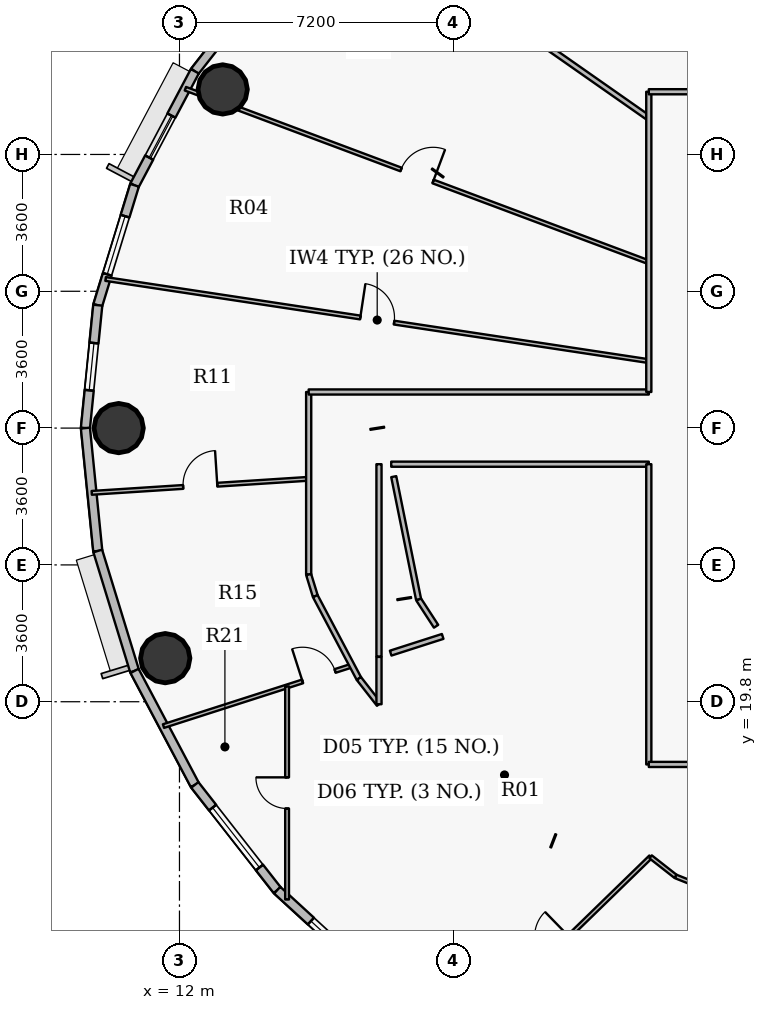
"""IFC4 building model, lengths in metres.
Left out: names, types, materials, properties, quantities, classifications, styles, units other than length and angle.
Written with IfcOpenShell. Run it as: python <this file> out.ifc"""

import sys

from ifc_helpers import new_model, si_unit, direction, frame, frame_2d, origin, origin_2d, place, context, subcontext, project, spatial, rectangle, hollow_circle, extrude, source, transform, mapped, element, fill, save


model = new_model("IFC4")
c1 = context("Model", 3, precision=1e-05, world=origin(), true_north=direction((0.0, 1.0)))
c2 = subcontext(c1, "Body", "Model", "MODEL_VIEW")
j1 = project(units=[si_unit("LENGTHUNIT", "METRE"), si_unit("PLANEANGLEUNIT", "RADIAN")], contexts=[c1])
p1 = place(None, origin())
s1 = spatial("IfcSite", under=j1, at=p1, CompositionType="ELEMENT")
p2 = place(p1, origin())
s2 = spatial("IfcBuilding", under=s1, at=p2, CompositionType="ELEMENT")
p3 = place(p2, frame((0.0, 0.0, 171.15)))
s3 = spatial("IfcBuildingStorey", under=s2, at=p3, CompositionType="ELEMENT", Elevation=171.15)
for number, where, z_axis, x_axis in (
    (1, (13.137, 35.911, 0.0), (0.0, 0.0, 1.0), (1.0, 0.0, 0.0)),
    (2, (10.4, 27.0, 0.0), (0.0, 0.0, 1.0), (1.0, 0.0, 0.0)),
    (3, (11.625, 20.947, 0.0), (0.0, 0.0, 1.0), (1.0, 0.0, 0.0)),
):
    element("IfcColumn", number, at=place(p3, frame(where, z_axis=z_axis, x_axis=x_axis)), inside=s3, PredefinedType="COLUMN", context=c2, shape_type="SweptSolid", body=[
        extrude(hollow_circle(Radius=0.65, WallThickness=0.04, at=origin_2d()), origin(), (0.0, 0.0, 1.0), 3.75),
    ])
p4 = place(p3, frame((12.404, 36.388, 0.0), z_axis=(0.0, 0.0, 1.0), x_axis=(0.616287674549, 0.787521112224, 0.0)))
e4 = element("IfcWall", 4, at=p4, inside=s3, PredefinedType="SOLIDWALL", context=c2, shape_type="SweptSolid", body=[
    extrude(rectangle(XDim=3.517, YDim=0.24, at=frame_2d((1.759, 0.0))), origin(), (0.0, 0.0, 1.0), 3.5),
])
p5 = place(p3, frame((10.817, 33.389, 0.0), z_axis=(0.0, 0.0, 1.0), x_axis=(0.467586874938, 0.88394712194, 0.0)))
e5 = element("IfcWall", 5, at=p5, inside=s3, PredefinedType="SOLIDWALL", context=c2, shape_type="SweptSolid", body=[
    extrude(rectangle(XDim=3.393, YDim=0.24, at=frame_2d((1.697, 0.0))), origin(), (0.0, 0.0, 1.0), 3.5),
])
p6 = place(p5, frame((0.825, 0.0, 0.9)))
e6 = element("IfcOpeningElement", 6, at=p6, cuts=e5, PredefinedType="OPENING", context=c2, shape_type="SweptSolid", body=[
    extrude(rectangle(XDim=1.25, YDim=1.65, at=origin_2d()), frame((0.625, 0.13, 0.825), z_axis=(0.0, -1.0, 0.0), x_axis=(1.0, 0.0, 0.0)), (0.0, 0.0, 1.0), 0.26),
])
p7 = place(p3, frame((9.85, 30.234, 0.0), z_axis=(0.0, 0.0, 1.0), x_axis=(0.293097995113, 0.956082405058, 0.0)))
e7 = element("IfcWall", 7, at=p7, inside=s3, PredefinedType="SOLIDWALL", context=c2, shape_type="SweptSolid", body=[
    extrude(rectangle(XDim=3.3, YDim=0.24, at=frame_2d((1.65, 0.0))), origin(), (0.0, 0.0, 1.0), 3.5),
])
p8 = place(p7, frame((0.85, 0.0, 0.9)))
e8 = element("IfcOpeningElement", 8, at=p8, cuts=e7, PredefinedType="OPENING", context=c2, shape_type="SweptSolid", body=[
    extrude(rectangle(XDim=1.6, YDim=1.75, at=origin_2d()), frame((0.8, 0.13, 0.875), z_axis=(0.0, -1.0, 0.0), x_axis=(1.0, 0.0, 0.0)), (0.0, 0.0, 1.0), 0.26),
])
p9 = place(p3, frame((9.525, 27.0, 0.0), z_axis=(0.0, 0.0, 1.0), x_axis=(0.100061534614, 0.994981250723, 0.0)))
e9 = element("IfcWall", 9, at=p9, inside=s3, PredefinedType="SOLIDWALL", context=c2, shape_type="SweptSolid", body=[
    extrude(rectangle(XDim=3.25, YDim=0.24, at=frame_2d((1.625, 0.0))), origin(), (0.0, 0.0, 1.0), 3.5),
])
p10 = place(p9, frame((1.0, 0.0, 0.9)))
e10 = element("IfcOpeningElement", 10, at=p10, cuts=e9, PredefinedType="OPENING", context=c2, shape_type="SweptSolid", body=[
    extrude(rectangle(XDim=1.25, YDim=1.65, at=origin_2d()), frame((0.625, 0.13, 0.825), z_axis=(0.0, -1.0, 0.0), x_axis=(1.0, 0.0, 0.0)), (0.0, 0.0, 1.0), 0.26),
])
p11 = place(p3, frame((9.85, 23.766, 0.0), z_axis=(0.0, 0.0, 1.0), x_axis=(-0.100061534614, 0.994981250723, 0.0)))
e11 = element("IfcWall", 11, at=p11, inside=s3, PredefinedType="SOLIDWALL", context=c2, shape_type="SweptSolid", body=[
    extrude(rectangle(XDim=3.25, YDim=0.24, at=frame_2d((1.625, 0.0))), origin(), (0.0, 0.0, 1.0), 3.5),
])
p12 = place(p3, frame((10.817, 20.611, 0.0), z_axis=(0.0, 0.0, 1.0), x_axis=(-0.293097995113, 0.956082405058, 0.0)))
e12 = element("IfcWall", 12, at=p12, inside=s3, PredefinedType="SOLIDWALL", context=c2, shape_type="SweptSolid", body=[
    extrude(rectangle(XDim=3.3, YDim=0.24, at=frame_2d((1.65, 0.0))), origin(), (0.0, 0.0, 1.0), 3.5),
])
p13 = place(p3, frame((12.404, 17.612, 0.0), z_axis=(0.0, 0.0, 1.0), x_axis=(-0.467586874938, 0.88394712194, 0.0)))
e13 = element("IfcWall", 13, at=p13, inside=s3, PredefinedType="SOLIDWALL", context=c2, shape_type="SweptSolid", body=[
    extrude(rectangle(XDim=3.393, YDim=0.24, at=frame_2d((1.697, 0.0))), origin(), (0.0, 0.0, 1.0), 3.5),
])
p14 = place(p3, frame((14.572, 14.842, 0.0), z_axis=(0.0, 0.0, 1.0), x_axis=(-0.616287674549, 0.787521112224, 0.0)))
e14 = element("IfcWall", 14, at=p14, inside=s3, PredefinedType="SOLIDWALL", context=c2, shape_type="SweptSolid", body=[
    extrude(rectangle(XDim=3.517, YDim=0.24, at=frame_2d((1.759, 0.0))), origin(), (0.0, 0.0, 1.0), 3.5),
])
p15 = place(p14, frame((0.759, 0.0, 0.9)))
e15 = element("IfcOpeningElement", 15, at=p15, cuts=e14, PredefinedType="OPENING", context=c2, shape_type="SweptSolid", body=[
    extrude(rectangle(XDim=2.0, YDim=1.75, at=origin_2d()), frame((1.0, 0.13, 0.875), z_axis=(0.0, -1.0, 0.0), x_axis=(1.0, 0.0, 0.0)), (0.0, 0.0, 1.0), 0.26),
])
p16 = place(p3, frame((17.268, 12.369, 0.0), z_axis=(0.0, 0.0, 1.0), x_axis=(-0.737076565834, 0.675809245349, 0.0)))
e16 = element("IfcWall", 16, at=p16, inside=s3, PredefinedType="SOLIDWALL", context=c2, shape_type="SweptSolid", body=[
    extrude(rectangle(XDim=3.658, YDim=0.24, at=frame_2d((1.829, 0.0))), origin(), (0.0, 0.0, 1.0), 3.5),
])
p17 = place(p16, frame((1.204, 0.0, 0.9)))
e17 = element("IfcOpeningElement", 17, at=p17, cuts=e16, PredefinedType="OPENING", context=c2, shape_type="SweptSolid", body=[
    extrude(rectangle(XDim=1.25, YDim=1.65, at=origin_2d()), frame((0.625, 0.13, 0.825), z_axis=(0.0, -1.0, 0.0), x_axis=(1.0, 0.0, 0.0)), (0.0, 0.0, 1.0), 0.26),
])
p18 = place(p3, frame((9.691, 25.296, 0.0), z_axis=(0.0, 0.0, 1.0), x_axis=(0.99791042292, 0.064612598054, 0.0)))
e18 = element("IfcWall", 18, at=p18, inside=s3, PredefinedType="PARTITIONING", context=c2, shape_type="SweptSolid", body=[
    extrude(rectangle(XDim=5.721, YDim=0.1, at=frame_2d((2.86, 0.0))), origin(), (0.0, 0.0, 1.0), 2.935),
])
p19 = place(p18, frame((2.41, 0.0, 0.0)))
e19 = element("IfcOpeningElement", 19, at=p19, cuts=e18, PredefinedType="OPENING", context=c2, shape_type="SweptSolid", body=[
    extrude(rectangle(XDim=0.9, YDim=2.1, at=origin_2d()), frame((0.45, 0.06, 1.05), z_axis=(0.0, -1.0, 0.0), x_axis=(1.0, 0.0, 0.0)), (0.0, 0.0, 1.0), 0.12),
])
p20 = place(p3, frame((10.056, 30.924, 0.0), z_axis=(0.0, 0.0, 1.0), x_axis=(0.988757382987, -0.149528718277, 0.0)))
e20 = element("IfcWall", 20, at=p20, inside=s3, PredefinedType="PARTITIONING", context=c2, shape_type="SweptSolid", body=[
    extrude(rectangle(XDim=14.456, YDim=0.1, at=frame_2d((7.228, 0.0))), origin(), (0.0, 0.0, 1.0), 2.935),
])
p21 = place(p20, frame((6.778, 0.0, 0.0)))
e21 = element("IfcOpeningElement", 21, at=p21, cuts=e20, PredefinedType="OPENING", context=c2, shape_type="SweptSolid", body=[
    extrude(rectangle(XDim=0.9, YDim=2.1, at=origin_2d()), frame((0.45, 0.06, 1.05), z_axis=(0.0, -1.0, 0.0), x_axis=(1.0, 0.0, 0.0)), (0.0, 0.0, 1.0), 0.12),
])
p22 = place(p3, frame((11.58, 19.159, 0.0), z_axis=(0.0, 0.0, 1.0), x_axis=(0.952134795804, 0.305678475885, 0.0)))
e22 = element("IfcWall", 22, at=p22, inside=s3, PredefinedType="PARTITIONING", context=c2, shape_type="SweptSolid", body=[
    extrude(rectangle(XDim=5.21, YDim=0.1, at=frame_2d((2.605, 0.0))), origin(), (0.0, 0.0, 1.0), 2.935),
])
p23 = place(p22, frame((3.843, 0.0, 0.0)))
e23 = element("IfcOpeningElement", 23, at=p23, cuts=e22, PredefinedType="OPENING", context=c2, shape_type="SweptSolid", body=[
    extrude(rectangle(XDim=0.9, YDim=2.1, at=origin_2d()), frame((0.45, 0.06, 1.05), z_axis=(0.0, -1.0, 0.0), x_axis=(1.0, 0.0, 0.0)), (0.0, 0.0, 1.0), 0.12),
])
p24 = place(p3, frame((12.156, 35.93, 0.0), z_axis=(0.0, 0.0, 1.0), x_axis=(0.936480111121, -0.350720688689, 0.0)))
e24 = element("IfcWall", 24, at=p24, inside=s3, PredefinedType="PARTITIONING", context=c2, shape_type="SweptSolid", body=[
    extrude(rectangle(XDim=13.021, YDim=0.1, at=frame_2d((6.511, 0.0))), origin(), (0.0, 0.0, 1.0), 2.935),
])
p25 = place(p24, frame((6.061, 0.0, 0.0)))
e25 = element("IfcOpeningElement", 25, at=p25, cuts=e24, PredefinedType="OPENING", context=c2, shape_type="SweptSolid", body=[
    extrude(rectangle(XDim=0.9, YDim=2.1, at=origin_2d()), frame((0.45, 0.06, 1.05), z_axis=(0.0, -1.0, 0.0), x_axis=(1.0, 0.0, 0.0)), (0.0, 0.0, 1.0), 0.12),
])
p26 = place(p3, frame((14.832, 14.596, 0.0), z_axis=(0.0, 0.0, 1.0), x_axis=(0.0, 1.0, 0.0)))
e26 = element("IfcWall", 26, at=p26, inside=s3, PredefinedType="PARTITIONING", context=c2, shape_type="SweptSolid", body=[
    extrude(rectangle(XDim=5.607, YDim=0.1, at=frame_2d((2.804, 0.0))), origin(), (0.0, 0.0, 1.0), 2.935),
])
p27 = place(p26, frame((2.394, 0.0, 0.0)))
e27 = element("IfcOpeningElement", 27, at=p27, cuts=e26, PredefinedType="OPENING", context=c2, shape_type="SweptSolid", body=[
    extrude(rectangle(XDim=0.82, YDim=2.1, at=origin_2d()), frame((0.41, 0.06, 1.05), z_axis=(0.0, -1.0, 0.0), x_axis=(1.0, 0.0, 0.0)), (0.0, 0.0, 1.0), 0.12),
])
p28 = place(p3, frame((15.4, 23.146, 0.0), z_axis=(0.0, 0.0, 1.0), x_axis=(0.0, 1.0, 0.0)))
e28 = element("IfcWall", 28, at=p28, inside=s3, PredefinedType="PARTITIONING", context=c2, shape_type="SweptSolid", body=[
    extrude(rectangle(XDim=4.804, YDim=0.135, at=frame_2d((2.402, 0.0))), origin(), (0.0, 0.0, 1.0), 2.935),
])
p29 = place(p3, frame((15.4, 23.146, 0.0), z_axis=(0.0, 0.0, 1.0), x_axis=(0.293335154151, -0.956009669061, 0.0)))
e29 = element("IfcWall", 29, at=p29, inside=s3, PredefinedType="PARTITIONING", context=c2, shape_type="SweptSolid", body=[
    extrude(rectangle(XDim=0.594, YDim=0.135, at=frame_2d((0.297, 0.0))), origin(), (0.0, 0.0, 1.0), 3.5),
])
p30 = place(p3, frame((15.4, 27.95, 0.0), z_axis=(0.0, 0.0, 1.0), x_axis=(1.0, 0.0, 0.0)))
e30 = element("IfcWall", 30, at=p30, inside=s3, PredefinedType="PARTITIONING", context=c2, shape_type="SweptSolid", body=[
    extrude(rectangle(XDim=8.95, YDim=0.135, at=frame_2d((4.475, 0.0))), origin(), (0.0, 0.0, 1.0), 3.5),
])
p31 = place(p3, frame((15.574, 22.578, 0.0), z_axis=(0.0, 0.0, 1.0), x_axis=(0.467608615334, -0.883935621448, 0.0)))
e31 = element("IfcWall", 31, at=p31, inside=s3, PredefinedType="PARTITIONING", context=c2, shape_type="SweptSolid", body=[
    extrude(rectangle(XDim=2.452, YDim=0.135, at=frame_2d((1.226, 0.0))), origin(), (0.0, 0.0, 1.0), 2.935),
])
p32 = place(p3, frame((16.327, 40.775, 0.0), z_axis=(0.0, 0.0, 1.0), x_axis=(0.819149932575, -0.573579452179, 0.0)))
e32 = element("IfcWall", 32, at=p32, inside=s3, PredefinedType="PARTITIONING", context=c2, shape_type="SweptSolid", body=[
    extrude(rectangle(XDim=9.794, YDim=0.135, at=frame_2d((4.897, 0.0))), origin(), (0.0, 0.0, 1.0), 2.935),
])
p33 = place(p3, frame((16.72, 20.411, 0.0), z_axis=(0.0, 0.0, 1.0), x_axis=(0.616377221056, -0.787451027914, 0.0)))
e33 = element("IfcWall", 33, at=p33, inside=s3, PredefinedType="PARTITIONING", context=c2, shape_type="SweptSolid", body=[
    extrude(rectangle(XDim=0.859, YDim=0.135, at=frame_2d((0.43, 0.0))), origin(), (0.0, 0.0, 1.0), 3.5),
])
p34 = place(p3, frame((17.25, 19.734, 0.0), z_axis=(0.0, 0.0, 1.0), x_axis=(0.0, 1.0, 0.0)))
e34 = element("IfcWall", 34, at=p34, inside=s3, PredefinedType="PARTITIONING", context=c2, shape_type="SweptSolid", body=[
    extrude(rectangle(XDim=1.246, YDim=0.135, at=frame_2d((0.623, 0.0))), origin(), (0.0, 0.0, 1.0), 3.5),
])
p35 = place(p3, frame((17.572, 26.05, 0.0), z_axis=(0.0, 0.0, 1.0), x_axis=(1.0, 0.0, 0.0)))
e35 = element("IfcWall", 35, at=p35, inside=s3, PredefinedType="PARTITIONING", context=c2, shape_type="SweptSolid", body=[
    extrude(rectangle(XDim=6.778, YDim=0.135, at=frame_2d((3.389, 0.0))), origin(), (0.0, 0.0, 1.0), 3.5),
])
p36 = place(p3, frame((19.449, 10.905, 0.0), z_axis=(0.0, 0.0, 1.0), x_axis=(0.716921274016, 0.697154134222, 0.0)))
e36 = element("IfcWall", 36, at=p36, inside=s3, PredefinedType="PARTITIONING", context=c2, shape_type="SweptSolid", body=[
    extrude(rectangle(XDim=6.904, YDim=0.1, at=frame_2d((3.452, 0.0))), origin(), (0.0, 0.0, 1.0), 2.935),
])
p37 = place(p36, frame((3.002, 0.0, 0.0)))
e37 = element("IfcOpeningElement", 37, at=p37, cuts=e36, PredefinedType="OPENING", context=c2, shape_type="SweptSolid", body=[
    extrude(rectangle(XDim=0.9, YDim=2.1, at=origin_2d()), frame((0.45, 0.06, 1.05), z_axis=(0.0, -1.0, 0.0), x_axis=(1.0, 0.0, 0.0)), (0.0, 0.0, 1.0), 0.12),
])
p38 = place(p3, frame((23.699, 45.319, 0.0), z_axis=(0.0, 0.0, 1.0), x_axis=(0.557458426319, -0.830204856, 0.0)))
e38 = element("IfcWall", 38, at=p38, inside=s3, PredefinedType="PARTITIONING", context=c2, shape_type="SweptSolid", body=[
    extrude(rectangle(XDim=11.406, YDim=0.15, at=frame_2d((5.703, 0.0))), origin(), (0.0, 0.0, 1.0), 2.935),
])
p39 = place(p38, frame((2.412, 0.0, 0.0)))
e39 = element("IfcOpeningElement", 39, at=p39, cuts=e38, PredefinedType="OPENING", context=c2, shape_type="SweptSolid", body=[
    extrude(rectangle(XDim=1.05, YDim=2.15, at=origin_2d()), frame((0.525, 0.085, 1.075), z_axis=(0.0, -1.0, 0.0), x_axis=(1.0, 0.0, 0.0)), (0.0, 0.0, 1.0), 0.17),
])
p40 = place(p3, frame((24.35, 18.15, 0.0), z_axis=(0.0, 0.0, 1.0), x_axis=(0.0, 1.0, 0.0)))
e40 = element("IfcWall", 40, at=p40, inside=s3, PredefinedType="PARTITIONING", context=c2, shape_type="SweptSolid", body=[
    extrude(rectangle(XDim=7.9, YDim=0.135, at=frame_2d((3.95, 0.0))), origin(), (0.0, 0.0, 1.0), 2.935),
])
p41 = place(p3, frame((24.35, 18.15, 0.0), z_axis=(0.0, 0.0, 1.0), x_axis=(1.0, 0.0, 0.0)))
e41 = element("IfcWall", 41, at=p41, inside=s3, PredefinedType="PARTITIONING", context=c2, shape_type="SweptSolid", body=[
    extrude(rectangle(XDim=9.109, YDim=0.135, at=frame_2d((4.554, 0.0))), origin(), (0.0, 0.0, 1.0), 2.935),
])
p42 = place(p41, frame((4.054, 0.0, 0.0)))
e42 = element("IfcOpeningElement", 42, at=p42, cuts=e41, PredefinedType="OPENING", context=c2, shape_type="SweptSolid", body=[
    extrude(rectangle(XDim=1.0, YDim=2.15, at=origin_2d()), frame((0.5, 0.078, 1.075), z_axis=(0.0, -1.0, 0.0), x_axis=(1.0, 0.0, 0.0)), (0.0, 0.0, 1.0), 0.155),
])
p43 = place(p3, frame((24.35, 27.95, 0.0), z_axis=(0.0, 0.0, 1.0), x_axis=(0.0, 1.0, 0.0)))
e43 = element("IfcWall", 43, at=p43, inside=s3, PredefinedType="PARTITIONING", context=c2, shape_type="SweptSolid", body=[
    extrude(rectangle(XDim=7.9, YDim=0.135, at=frame_2d((3.95, 0.0))), origin(), (0.0, 0.0, 1.0), 2.935),
])
p44 = place(p3, frame((24.35, 35.85, 0.0), z_axis=(0.0, 0.0, 1.0), x_axis=(1.0, 0.0, 0.0)))
e44 = element("IfcWall", 44, at=p44, inside=s3, PredefinedType="PARTITIONING", context=c2, shape_type="SweptSolid", body=[
    extrude(rectangle(XDim=19.343, YDim=0.135, at=frame_2d((9.671, 0.0))), origin(), (0.0, 0.0, 1.0), 2.935),
])
p45 = place(p44, frame((11.98, 0.0, 0.0)))
e45 = element("IfcOpeningElement", 45, at=p45, cuts=e44, PredefinedType="OPENING", context=c2, shape_type="SweptSolid", body=[
    extrude(rectangle(XDim=1.05, YDim=2.15, at=origin_2d()), frame((0.525, 0.078, 1.075), z_axis=(0.0, -1.0, 0.0), x_axis=(1.0, 0.0, 0.0)), (0.0, 0.0, 1.0), 0.155),
])
p46 = place(p44, frame((2.464, 0.0, 0.0)))
e46 = element("IfcOpeningElement", 46, at=p46, cuts=e44, PredefinedType="OPENING", context=c2, shape_type="SweptSolid", body=[
    extrude(rectangle(XDim=0.82, YDim=2.1, at=origin_2d()), frame((0.41, 0.078, 1.05), z_axis=(0.0, -1.0, 0.0), x_axis=(1.0, 0.0, 0.0)), (0.0, 0.0, 1.0), 0.155),
])
p47 = place(p3, frame((24.399, 15.718, 0.0), z_axis=(0.0, 0.0, 1.0), x_axis=(0.787251731647, -0.616631746684, 0.0)))
e47 = element("IfcWall", 47, at=p47, inside=s3, PredefinedType="PARTITIONING", context=c2, shape_type="SweptSolid", body=[
    extrude(rectangle(XDim=0.834, YDim=0.1, at=frame_2d((0.417, 0.0))), origin(), (0.0, 0.0, 1.0), 3.5),
])
p48 = place(p3, frame((25.055, 15.204, 0.0), z_axis=(0.0, 0.0, 1.0), x_axis=(0.928798710424, -0.370584613166, 0.0)))
e48 = element("IfcWall", 48, at=p48, inside=s3, PredefinedType="PARTITIONING", context=c2, shape_type="SweptSolid", body=[
    extrude(rectangle(XDim=5.589, YDim=0.1, at=frame_2d((2.794, 0.0))), origin(), (0.0, 0.0, 1.0), 2.935),
])
p49 = place(p3, frame((17.25, 26.05, 0.0), z_axis=(0.0, 0.0, 1.0), x_axis=(0.0, -1.0, 0.0)))
e49 = element("IfcWall", 49, at=p49, inside=s3, PredefinedType="PARTITIONING", context=c2, shape_type="SweptSolid", body=[
    extrude(rectangle(XDim=5.06, YDim=0.135, at=frame_2d((2.53, 0.0))), origin(), (0.0, 0.0, 1.0), 2.935),
])
p50 = place(p3, frame((17.558, 21.079, 0.0), z_axis=(0.0, 0.0, 1.0), x_axis=(0.952123939642, 0.305712288861, 0.0)))
e50 = element("IfcWall", 50, at=p50, inside=s3, PredefinedType="PARTITIONING", context=c2, shape_type="SweptSolid", body=[
    extrude(rectangle(XDim=1.438, YDim=0.135, at=frame_2d((0.719, 0.0))), origin(), (0.0, 0.0, 1.0), 3.5),
])
p51 = place(p3, frame((18.752, 21.785, 0.0), z_axis=(0.0, 0.0, 1.0), x_axis=(-0.545404374412, 0.838173053953, 0.0)))
e51 = element("IfcWall", 51, at=p51, inside=s3, PredefinedType="PARTITIONING", context=c2, shape_type="SweptSolid", body=[
    extrude(rectangle(XDim=0.845, YDim=0.135, at=frame_2d((0.423, 0.0))), origin(), (0.0, 0.0, 1.0), 2.935),
])
p52 = place(p3, frame((18.291, 22.494, 0.0), z_axis=(0.0, 0.0, 1.0), x_axis=(-0.198211153628, 0.980159343463, 0.0)))
e52 = element("IfcWall", 52, at=p52, inside=s3, PredefinedType="PARTITIONING", context=c2, shape_type="SweptSolid", body=[
    extrude(rectangle(XDim=3.294, YDim=0.135, at=frame_2d((1.647, 0.0))), origin(), (0.0, 0.0, 1.0), 2.935),
])
m1 = source(origin(), c2, "Body", "SweptSolid", [
    extrude(rectangle(XDim=1.25, YDim=1.65, at=origin_2d()), frame((0.625, 0.03, 0.825), z_axis=(0.0, -1.0, 0.0), x_axis=(1.0, 0.0, 0.0)), (0.0, 0.0, 1.0), 0.06),
])
p53 = place(p6, origin())
e53 = element("IfcWindow", 53, at=p53, inside=s3, PartitioningType="SINGLE_PANEL", PredefinedType="WINDOW", context=c2, shape_type="MappedRepresentation", body=[
    mapped(m1, transform((0.0, 0.0, 0.0), x_axis=(1.0, 0.0, 0.0), y_axis=(0.0, 1.0, 0.0), z_axis=(0.0, 0.0, 1.0), scale=1.0)),
])
fill(e6, e53)
m2 = source(origin(), c2, "Body", "SweptSolid", [
    extrude(rectangle(XDim=1.6, YDim=1.75, at=origin_2d()), frame((0.8, 0.03, 0.875), z_axis=(0.0, -1.0, 0.0), x_axis=(1.0, 0.0, 0.0)), (0.0, 0.0, 1.0), 0.06),
])
p54 = place(p8, origin())
e54 = element("IfcWindow", 54, at=p54, inside=s3, PartitioningType="DOUBLE_PANEL_VERTICAL", PredefinedType="WINDOW", context=c2, shape_type="MappedRepresentation", body=[
    mapped(m2, transform((0.0, 0.0, 0.0), x_axis=(1.0, 0.0, 0.0), y_axis=(0.0, 1.0, 0.0), z_axis=(0.0, 0.0, 1.0), scale=1.0)),
])
fill(e8, e54)
m3 = source(origin(), c2, "Body", "SweptSolid", [
    extrude(rectangle(XDim=2.0, YDim=1.75, at=origin_2d()), frame((1.0, 0.03, 0.875), z_axis=(0.0, -1.0, 0.0), x_axis=(1.0, 0.0, 0.0)), (0.0, 0.0, 1.0), 0.06),
])
p55 = place(p15, origin())
e55 = element("IfcWindow", 55, at=p55, inside=s3, PartitioningType="DOUBLE_PANEL_VERTICAL", PredefinedType="WINDOW", context=c2, shape_type="MappedRepresentation", body=[
    mapped(m3, transform((0.0, 0.0, 0.0), x_axis=(1.0, 0.0, 0.0), y_axis=(0.0, 1.0, 0.0), z_axis=(0.0, 0.0, 1.0), scale=1.0)),
])
fill(e15, e55)
p56 = place(p17, origin())
e56 = element("IfcWindow", 56, at=p56, inside=s3, PartitioningType="SINGLE_PANEL", PredefinedType="WINDOW", context=c2, shape_type="MappedRepresentation", body=[
    mapped(m1, transform((0.0, 0.0, 0.0), x_axis=(1.0, 0.0, 0.0), y_axis=(0.0, 1.0, 0.0), z_axis=(0.0, 0.0, 1.0), scale=1.0)),
])
fill(e17, e56)
p57 = place(p10, origin())
e57 = element("IfcWindow", 57, at=p57, inside=s3, PartitioningType="SINGLE_PANEL", PredefinedType="WINDOW", context=c2, shape_type="MappedRepresentation", body=[
    mapped(m1, transform((0.0, 0.0, 0.0), x_axis=(1.0, 0.0, 0.0), y_axis=(0.0, 1.0, 0.0), z_axis=(0.0, 0.0, 1.0), scale=1.0)),
])
fill(e10, e57)
m4 = source(origin(), c2, "Body", "SweptSolid", [
    extrude(rectangle(XDim=0.9, YDim=2.1, at=origin_2d()), frame((0.45, 0.025, 1.05), z_axis=(0.0, -1.0, 0.0), x_axis=(1.0, 0.0, 0.0)), (0.0, 0.0, 1.0), 0.05),
])
p58 = place(p23, origin())
e58 = element("IfcDoor", 58, at=p58, inside=s3, OperationType="SINGLE_SWING_LEFT", PredefinedType="DOOR", context=c2, shape_type="MappedRepresentation", body=[
    mapped(m4, transform((0.0, 0.0, 0.0), x_axis=(1.0, 0.0, 0.0), y_axis=(0.0, 1.0, 0.0), z_axis=(0.0, 0.0, 1.0), scale=1.0)),
])
fill(e23, e58)
m5 = source(origin(), c2, "Body", "SweptSolid", [
    extrude(rectangle(XDim=0.82, YDim=2.1, at=origin_2d()), frame((0.41, 0.025, 1.05), z_axis=(0.0, -1.0, 0.0), x_axis=(1.0, 0.0, 0.0)), (0.0, 0.0, 1.0), 0.05),
])
p59 = place(p27, origin())
e59 = element("IfcDoor", 59, at=p59, inside=s3, OperationType="SINGLE_SWING_RIGHT", PredefinedType="DOOR", context=c2, shape_type="MappedRepresentation", body=[
    mapped(m5, transform((0.0, 0.0, 0.0), x_axis=(1.0, 0.0, 0.0), y_axis=(0.0, 1.0, 0.0), z_axis=(0.0, 0.0, 1.0), scale=1.0)),
])
fill(e27, e59)
p60 = place(p19, origin())
e60 = element("IfcDoor", 60, at=p60, inside=s3, OperationType="SINGLE_SWING_RIGHT", PredefinedType="DOOR", context=c2, shape_type="MappedRepresentation", body=[
    mapped(m4, transform((0.0, 0.0, 0.0), x_axis=(1.0, 0.0, 0.0), y_axis=(0.0, 1.0, 0.0), z_axis=(0.0, 0.0, 1.0), scale=1.0)),
])
fill(e19, e60)
p61 = place(p21, origin())
e61 = element("IfcDoor", 61, at=p61, inside=s3, OperationType="SINGLE_SWING_LEFT", PredefinedType="DOOR", context=c2, shape_type="MappedRepresentation", body=[
    mapped(m4, transform((0.0, 0.0, 0.0), x_axis=(1.0, 0.0, 0.0), y_axis=(0.0, 1.0, 0.0), z_axis=(0.0, 0.0, 1.0), scale=1.0)),
])
fill(e21, e61)
p62 = place(p25, origin())
e62 = element("IfcDoor", 62, at=p62, inside=s3, OperationType="SINGLE_SWING_RIGHT", PredefinedType="DOOR", context=c2, shape_type="MappedRepresentation", body=[
    mapped(m4, transform((0.0, 0.0, 0.0), x_axis=(1.0, 0.0, 0.0), y_axis=(0.0, 1.0, 0.0), z_axis=(0.0, 0.0, 1.0), scale=1.0)),
])
fill(e25, e62)
save(model, sys.argv[1])
